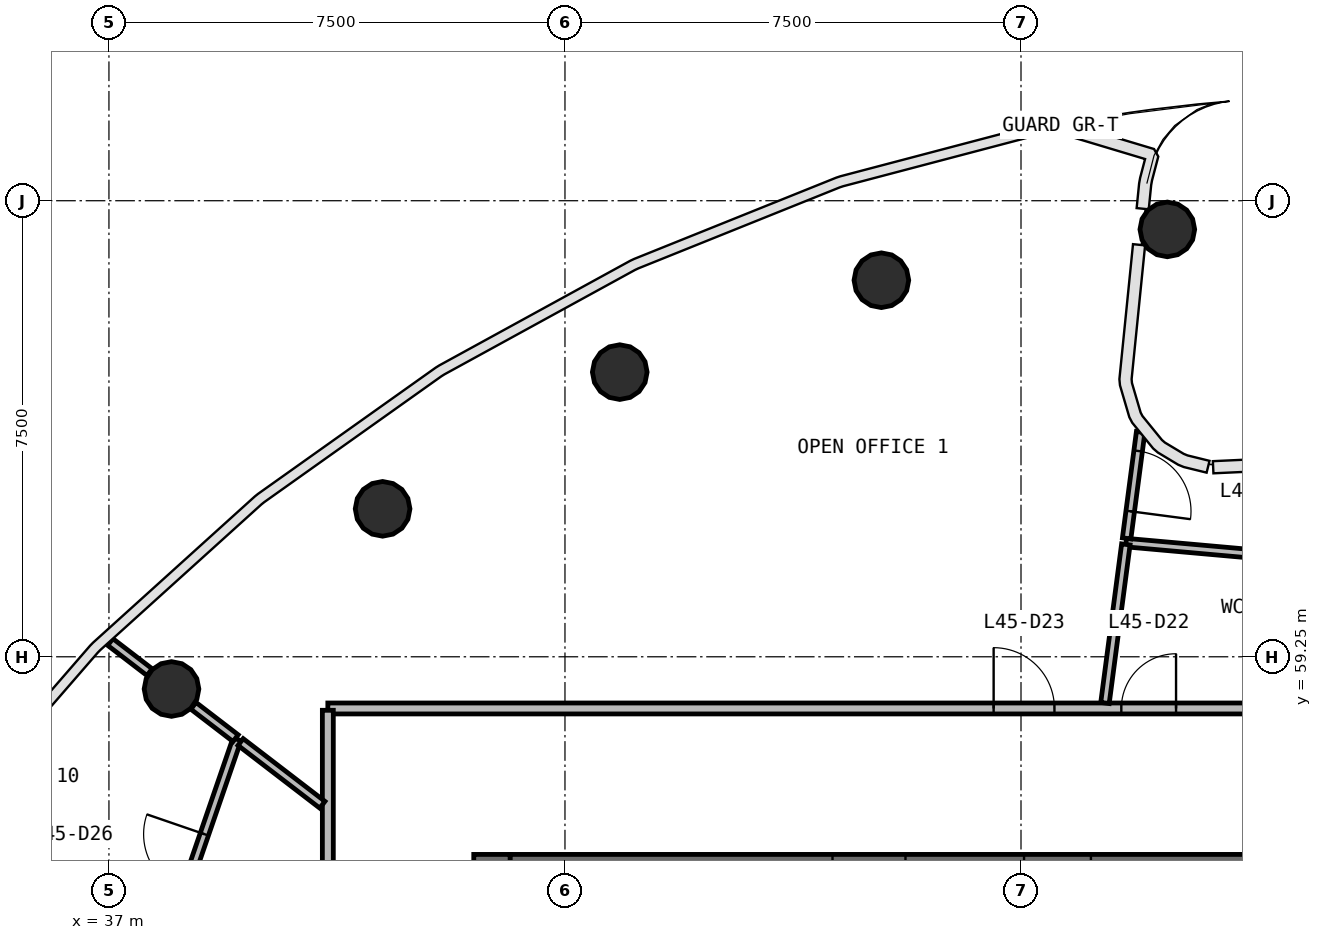
"""IFC4 building model, lengths in metres.
Left out: names, types, materials, properties, quantities, classifications, styles, units other than length and angle.
Written with IfcOpenShell. Run it as: python <this file> out.ifc"""

import sys

from ifc_helpers import new_model, si_unit, direction, frame, frame_2d, origin, origin_2d, place, context, subcontext, project, spatial, rectangle, circle, extrude, source, transform, mapped, element, fill, save


model = new_model("IFC4")
c1 = context("Model", 3, precision=1e-05, world=origin(), true_north=direction((0.0, 1.0)))
c2 = subcontext(c1, "Body", "Model", "MODEL_VIEW")
j1 = project(units=[si_unit("LENGTHUNIT", "METRE"), si_unit("PLANEANGLEUNIT", "RADIAN")], contexts=[c1])
p1 = place(None, origin())
s1 = spatial("IfcSite", under=j1, at=p1, CompositionType="ELEMENT")
p2 = place(p1, origin())
s2 = spatial("IfcBuilding", under=s1, at=p2, CompositionType="ELEMENT")
p3 = place(p2, frame((0.0, 0.0, 187.7)))
s3 = spatial("IfcBuildingStorey", under=s2, at=p3, CompositionType="ELEMENT", Elevation=187.7)
p4 = place(p3, frame((43.3, 56.0, 0.0), z_axis=(0.0, 0.0, 1.0), x_axis=(0.0, -1.0, 0.0)))
e1 = element("IfcWall", 1, at=p4, inside=s3, PredefinedType="SHEAR", context=c2, shape_type="SweptSolid", body=[
    extrude(rectangle(XDim=16.0, YDim=0.6, at=frame_2d((8.0, 0.0))), origin(), (0.0, 0.0, 1.0), 3.9),
])
p5 = place(p4, frame((7.1, 0.0, 0.0)))
e2 = element("IfcOpeningElement", 2, at=p5, cuts=e1, PredefinedType="OPENING", context=c2, shape_type="SweptSolid", body=[
    extrude(rectangle(XDim=1.8, YDim=2.1, at=frame_2d((0.9, 1.05))), frame((0.0, 0.31, 0.0), z_axis=(0.0, -1.0, 0.0), x_axis=(1.0, 0.0, 0.0)), (0.0, 0.0, 1.0), 0.62),
])
p6 = place(p3, frame((60.4, 55.7, 0.0), z_axis=(0.0, 0.0, 1.0), x_axis=(-1.0, 0.0, 0.0)))
e3 = element("IfcWall", 3, at=p6, inside=s3, PredefinedType="SHEAR", context=c2, shape_type="SweptSolid", body=[
    extrude(rectangle(XDim=16.8, YDim=0.6, at=frame_2d((8.4, 0.0))), origin(), (0.0, 0.0, 1.0), 3.9),
])
p7 = place(p6, frame((0.4, 0.0, 0.0)))
e4 = element("IfcOpeningElement", 4, at=p7, cuts=e3, PredefinedType="OPENING", context=c2, shape_type="SweptSolid", body=[
    extrude(rectangle(XDim=1.1, YDim=2.1, at=frame_2d((0.55, 1.05))), frame((0.0, 0.31, 0.0), z_axis=(0.0, -1.0, 0.0), x_axis=(1.0, 0.0, 0.0)), (0.0, 0.0, 1.0), 0.62),
])
p8 = place(p6, frame((10.3, 0.0, 0.0)))
e5 = element("IfcOpeningElement", 5, at=p8, cuts=e3, PredefinedType="OPENING", context=c2, shape_type="SweptSolid", body=[
    extrude(rectangle(XDim=1.2, YDim=2.1, at=frame_2d((0.6, 1.05))), frame((0.0, 0.31, 0.0), z_axis=(0.0, -1.0, 0.0), x_axis=(1.0, 0.0, 0.0)), (0.0, 0.0, 1.0), 0.62),
])
p9 = place(p6, frame((7.25, 0.0, 0.0)))
e6 = element("IfcOpeningElement", 6, at=p9, cuts=e3, PredefinedType="OPENING", context=c2, shape_type="SweptSolid", body=[
    extrude(rectangle(XDim=1.1, YDim=2.1, at=frame_2d((0.55, 1.05))), frame((0.0, 0.31, 0.0), z_axis=(0.0, -1.0, 0.0), x_axis=(1.0, 0.0, 0.0)), (0.0, 0.0, 1.0), 0.62),
])
m1 = source(origin(), c2, "Body", "SweptSolid", [
    extrude(circle(Radius=0.45, at=origin_2d()), origin(), (0.0, 0.0, 1.0), 3.9),
])
for number, where, z_axis, x_axis in (
    (7, (54.406, 66.278, 0.0), (0.0, 0.0, 1.0), (1.0, 0.0, 0.0)),
    (8, (49.704, 65.442, 0.0), (0.0, 0.0, 1.0), (1.0, 0.0, 0.0)),
    (9, (45.401, 63.931, 0.0), (0.0, 0.0, 1.0), (1.0, 0.0, 0.0)),
    (10, (41.501, 61.683, 0.0), (0.0, 0.0, 1.0), (1.0, 0.0, 0.0)),
    (11, (38.029, 58.72, 0.0), (0.0, 0.0, 1.0), (1.0, 0.0, 0.0)),
):
    element("IfcColumn", number, at=place(p3, frame(where, z_axis=z_axis, x_axis=x_axis)), inside=s3, PredefinedType="COLUMN", context=c2, shape_type="MappedRepresentation", body=[
        mapped(m1, transform((0.0, 0.0, 0.0), scale=1.0)),
    ])
p10 = place(p3, frame((40.6, 58.4, 0.0), z_axis=(0.0, 0.0, 1.0), x_axis=(1.0, 0.0, 0.0)))
e12 = element("IfcWall", 12, at=p10, inside=s3, PredefinedType="PARTITIONING", context=c2, shape_type="SweptSolid", body=[
    extrude(rectangle(XDim=22.8, YDim=0.18, at=frame_2d((11.4, 0.0))), origin(), (0.0, 0.0, 1.0), 2.88),
])
p11 = place(p10, frame((16.05, 0.0, 0.0)))
e13 = element("IfcOpeningElement", 13, at=p11, cuts=e12, PredefinedType="OPENING", context=c2, shape_type="SweptSolid", body=[
    extrude(rectangle(XDim=0.9, YDim=2.1, at=frame_2d((0.45, 1.05))), frame((0.0, 0.1, 0.0), z_axis=(0.0, -1.0, 0.0), x_axis=(1.0, 0.0, 0.0)), (0.0, 0.0, 1.0), 0.2),
])
p12 = place(p10, frame((13.05, 0.0, 0.0)))
e14 = element("IfcOpeningElement", 14, at=p12, cuts=e12, PredefinedType="OPENING", context=c2, shape_type="SweptSolid", body=[
    extrude(rectangle(XDim=0.9, YDim=2.1, at=frame_2d((0.45, 1.05))), frame((0.0, 0.1, 0.0), z_axis=(0.0, -1.0, 0.0), x_axis=(1.0, 0.0, 0.0)), (0.0, 0.0, 1.0), 0.2),
])
p13 = place(p10, frame((10.95, 0.0, 0.0)))
e15 = element("IfcOpeningElement", 15, at=p13, cuts=e12, PredefinedType="OPENING", context=c2, shape_type="SweptSolid", body=[
    extrude(rectangle(XDim=1.0, YDim=2.1, at=frame_2d((0.5, 1.05))), frame((0.0, 0.1, 0.0), z_axis=(0.0, -1.0, 0.0), x_axis=(1.0, 0.0, 0.0)), (0.0, 0.0, 1.0), 0.2),
])
p14 = place(p3, frame((40.6, 37.63, 0.0), z_axis=(0.0, 0.0, 1.0), x_axis=(0.0, 1.0, 0.0)))
e16 = element("IfcWall", 16, at=p14, inside=s3, PredefinedType="PARTITIONING", context=c2, shape_type="SweptSolid", body=[
    extrude(rectangle(XDim=20.74, YDim=0.18, at=frame_2d((10.37, 0.0))), origin(), (0.0, 0.0, 1.0), 2.88),
])
p15 = place(p14, frame((9.89, 0.0, 0.0)))
e17 = element("IfcOpeningElement", 17, at=p15, cuts=e16, PredefinedType="OPENING", context=c2, shape_type="SweptSolid", body=[
    extrude(rectangle(XDim=1.0, YDim=2.1, at=frame_2d((0.5, 1.05))), frame((0.0, 0.1, 0.0), z_axis=(0.0, -1.0, 0.0), x_axis=(1.0, 0.0, 0.0)), (0.0, 0.0, 1.0), 0.2),
])
p16 = place(p14, frame((7.69, 0.0, 0.0)))
e18 = element("IfcOpeningElement", 18, at=p16, cuts=e16, PredefinedType="OPENING", context=c2, shape_type="SweptSolid", body=[
    extrude(rectangle(XDim=1.0, YDim=2.1, at=frame_2d((0.5, 1.05))), frame((0.0, 0.1, 0.0), z_axis=(0.0, -1.0, 0.0), x_axis=(1.0, 0.0, 0.0)), (0.0, 0.0, 1.0), 0.2),
])
p17 = place(p3, frame((37.736, 53.909, 0.0), z_axis=(0.0, 0.0, 1.0), x_axis=(0.325372826871, 0.945585809715, 0.0)))
e19 = element("IfcWall", 19, at=p17, inside=s3, PredefinedType="PARTITIONING", context=c2, shape_type="SweptSolid", body=[
    extrude(rectangle(XDim=4.214, YDim=0.14, at=frame_2d((2.107, 0.0))), origin(), (0.0, 0.0, 1.0), 2.88),
])
p18 = place(p17, frame((1.564, 0.0, 0.0)))
e20 = element("IfcOpeningElement", 20, at=p18, cuts=e19, PredefinedType="OPENING", context=c2, shape_type="SweptSolid", body=[
    extrude(rectangle(XDim=1.0, YDim=2.1, at=frame_2d((0.5, 1.05))), frame((0.0, 0.08, 0.0), z_axis=(0.0, -1.0, 0.0), x_axis=(1.0, 0.0, 0.0)), (0.0, 0.0, 1.0), 0.16),
])
p19 = place(p3, frame((57.275, 60.811, 0.0), z_axis=(0.0, 0.0, 1.0), x_axis=(-0.996026962711, 0.08905217321, 0.0)))
e21 = element("IfcWall", 21, at=p19, inside=s3, PredefinedType="PARTITIONING", context=c2, shape_type="SweptSolid", body=[
    extrude(rectangle(XDim=3.561, YDim=0.14, at=frame_2d((1.781, 0.0))), origin(), (0.0, 0.0, 1.0), 2.88),
])
p20 = place(p3, frame((53.381, 58.49, 0.0), z_axis=(0.0, 0.0, 1.0), x_axis=(0.130497729181, 0.991448608188, 0.0)))
e22 = element("IfcWall", 22, at=p20, inside=s3, PredefinedType="PARTITIONING", context=c2, shape_type="SweptSolid", body=[
    extrude(rectangle(XDim=2.63, YDim=0.14, at=frame_2d((1.315, 0.0))), origin(), (0.0, 0.0, 1.0), 2.88),
])
p21 = place(p3, frame((40.51, 56.817, 0.0), z_axis=(0.0, 0.0, 1.0), x_axis=(-0.793383743535, 0.608721804681, 0.0)))
e23 = element("IfcWall", 23, at=p21, inside=s3, PredefinedType="PARTITIONING", context=c2, shape_type="SweptSolid", body=[
    extrude(rectangle(XDim=1.695, YDim=0.14, at=frame_2d((0.847, 0.0))), origin(), (0.0, 0.0, 1.0), 2.88),
])
p22 = place(p3, frame((53.968, 62.946, 0.0), z_axis=(0.0, 0.0, 1.0), x_axis=(-0.130658590835, -0.991427421772, 0.0)))
e24 = element("IfcWall", 24, at=p22, inside=s3, PredefinedType="PARTITIONING", context=c2, shape_type="SweptSolid", body=[
    extrude(rectangle(XDim=1.764, YDim=0.14, at=frame_2d((0.882, 0.0))), origin(), (0.0, 0.0, 1.0), 2.88),
])
p23 = place(p22, frame((0.314, 0.0, 0.0)))
e25 = element("IfcOpeningElement", 25, at=p23, cuts=e24, PredefinedType="OPENING", context=c2, shape_type="SweptSolid", body=[
    extrude(rectangle(XDim=1.0, YDim=2.1, at=frame_2d((0.5, 1.05))), frame((0.0, 0.08, 0.0), z_axis=(0.0, -1.0, 0.0), x_axis=(1.0, 0.0, 0.0)), (0.0, 0.0, 1.0), 0.16),
])
p24 = place(p3, frame((39.083, 57.912, 0.0), z_axis=(0.0, 0.0, 1.0), x_axis=(-0.793381490019, 0.608724741814, 0.0)))
e26 = element("IfcWall", 26, at=p24, inside=s3, PredefinedType="PARTITIONING", context=c2, shape_type="SweptSolid", body=[
    extrude(rectangle(XDim=0.874, YDim=0.14, at=frame_2d((0.437, 0.0))), origin(), (0.0, 0.0, 1.0), 2.88),
])
p25 = place(p3, frame((37.668, 58.997, 0.0), z_axis=(0.0, 0.0, 1.0), x_axis=(-0.793336246331, 0.608783705644, 0.0)))
e27 = element("IfcWall", 27, at=p25, inside=s3, PredefinedType="PARTITIONING", context=c2, shape_type="SweptSolid", body=[
    extrude(rectangle(XDim=0.815, YDim=0.14, at=frame_2d((0.407, 0.0))), origin(), (0.0, 0.0, 1.0), 2.88),
])
m2 = source(origin(), c2, "Body", "SweptSolid", [
    extrude(rectangle(XDim=0.9, YDim=2.1, at=frame_2d((0.45, 1.05))), frame((0.0, 0.025, 0.0), z_axis=(0.0, -1.0, 0.0), x_axis=(1.0, 0.0, 0.0)), (0.0, 0.0, 1.0), 0.05),
])
p26 = place(p12, origin())
e28 = element("IfcDoor", 28, at=p26, inside=s3, OperationType="SINGLE_SWING_RIGHT", PredefinedType="DOOR", context=c2, shape_type="MappedRepresentation", body=[
    mapped(m2, transform((0.0, 0.0, 0.0), scale=1.0)),
])
fill(e14, e28)
m3 = source(origin(), c2, "Body", "SweptSolid", [
    extrude(rectangle(XDim=1.0, YDim=2.1, at=frame_2d((0.5, 1.05))), frame((0.0, 0.025, 0.0), z_axis=(0.0, -1.0, 0.0), x_axis=(1.0, 0.0, 0.0)), (0.0, 0.0, 1.0), 0.05),
])
p27 = place(p13, origin())
e29 = element("IfcDoor", 29, at=p27, inside=s3, OperationType="SINGLE_SWING_LEFT", PredefinedType="DOOR", context=c2, shape_type="MappedRepresentation", body=[
    mapped(m3, transform((0.0, 0.0, 0.0), scale=1.0)),
])
fill(e15, e29)
p28 = place(p23, origin())
e30 = element("IfcDoor", 30, at=p28, inside=s3, OperationType="SINGLE_SWING_RIGHT", PredefinedType="DOOR", context=c2, shape_type="MappedRepresentation", body=[
    mapped(m3, transform((0.0, 0.0, 0.0), scale=1.0)),
])
fill(e25, e30)
p29 = place(p18, origin())
e31 = element("IfcDoor", 31, at=p29, inside=s3, OperationType="SINGLE_SWING_RIGHT", PredefinedType="DOOR", context=c2, shape_type="MappedRepresentation", body=[
    mapped(m3, transform((0.0, 0.0, 0.0), scale=1.0)),
])
fill(e20, e31)
save(model, sys.argv[1])
